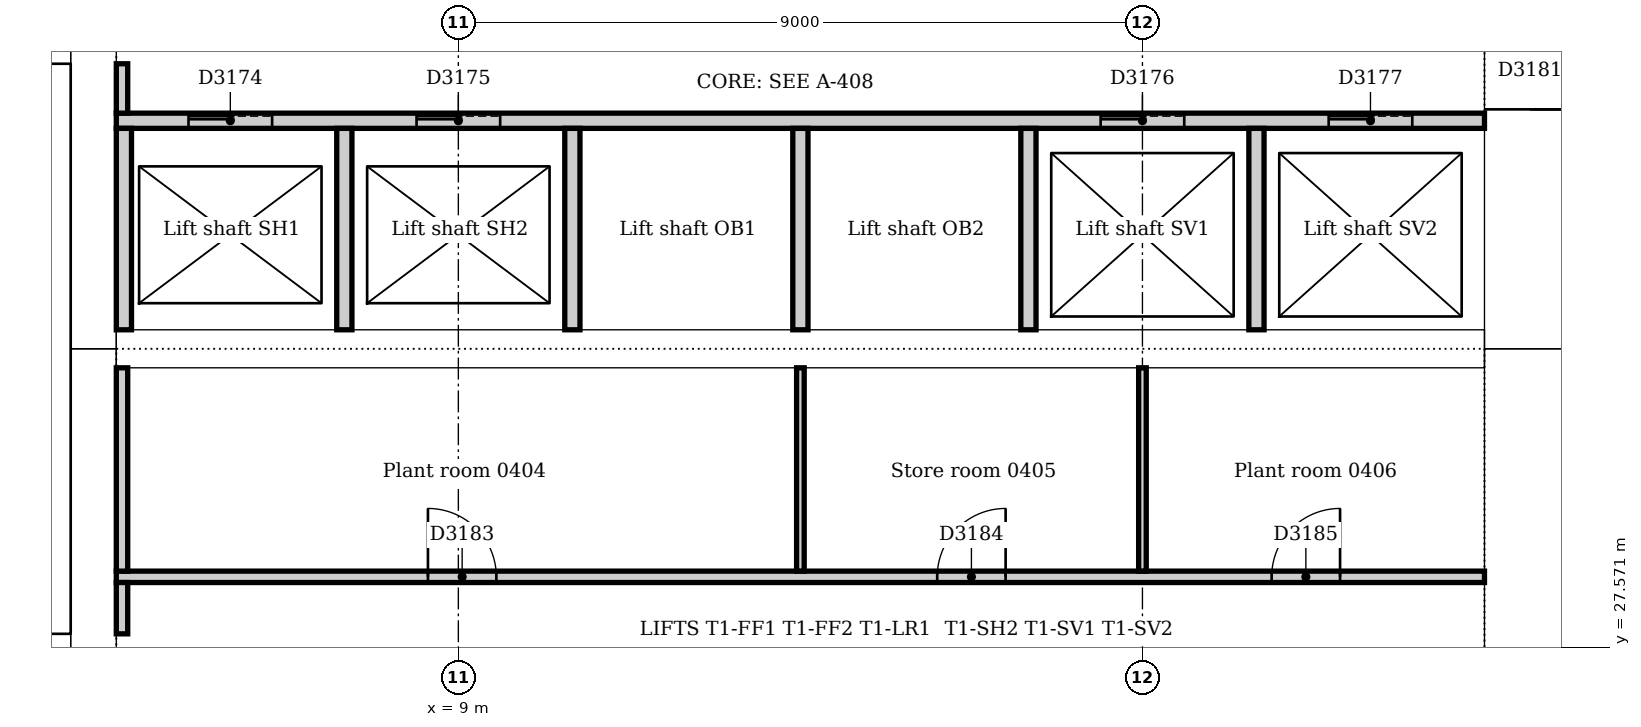
"""IFC4 building model, lengths in metres.
Left out: names, types, materials, properties, quantities, classifications, styles, units other than length and angle.
Written with IfcOpenShell. Run it as: python <this file> out.ifc"""

import sys

from ifc_helpers import new_model, si_unit, direction, frame, frame_2d, origin, place, context, subcontext, project, spatial, rectangle, extrude, element, fill, save


model = new_model("IFC4")
c1 = context("Model", 3, precision=1e-05, world=origin(), true_north=direction((0.0, 1.0)))
c2 = subcontext(c1, "Body", "Model", "MODEL_VIEW")
j1 = project(units=[si_unit("LENGTHUNIT", "METRE"), si_unit("PLANEANGLEUNIT", "RADIAN")], contexts=[c1])
p1 = place(None, origin())
s1 = spatial("IfcSite", under=j1, at=p1, CompositionType="ELEMENT")
p2 = place(p1, origin())
s2 = spatial("IfcBuilding", under=s1, at=p2, CompositionType="ELEMENT")
p3 = place(p2, frame((0.0, 0.0, 21.0)))
s3 = spatial("IfcBuildingStorey", under=s2, at=p3, CompositionType="ELEMENT", Elevation=21.0)
p4 = place(p3, frame((23.1, 21.0, 0.0), z_axis=(0.0, 0.0, 1.0), x_axis=(0.0, 1.0, 0.0)))
e1 = element("IfcWall", 1, at=p4, inside=s3, PredefinedType="SOLIDWALL", context=c2, shape_type="SweptSolid", body=[
    extrude(rectangle(XDim=10.5, YDim=1.2, at=frame_2d((5.25, 0.0))), origin(), (0.0, 0.0, 1.0), 5.0),
])
p5 = place(p4, frame((4.35, 0.0, 0.0)))
e2 = element("IfcOpeningElement", 2, at=p5, cuts=e1, PredefinedType="OPENING", context=c2, shape_type="SweptSolid", body=[
    extrude(rectangle(XDim=1.8, YDim=2.1, at=frame_2d((0.9, 1.05))), frame((0.0, 0.61, 0.0), z_axis=(0.0, -1.0, 0.0), x_axis=(1.0, 0.0, 0.0)), (0.0, 0.0, 1.0), 1.22),
])
p6 = place(p3, frame((23.1, 31.5, 0.0), z_axis=(0.0, 0.0, 1.0), x_axis=(0.0, 1.0, 0.0)))
e3 = element("IfcWall", 3, at=p6, inside=s3, PredefinedType="SOLIDWALL", context=c2, shape_type="SweptSolid", body=[
    extrude(rectangle(XDim=10.5, YDim=1.2, at=frame_2d((5.25, 0.0))), origin(), (0.0, 0.0, 1.0), 5.0),
])
p7 = place(p6, frame((3.15, 0.0, 0.0)))
e4 = element("IfcOpeningElement", 4, at=p7, cuts=e3, PredefinedType="OPENING", context=c2, shape_type="SweptSolid", body=[
    extrude(rectangle(XDim=1.0, YDim=2.1, at=frame_2d((0.5, 1.05))), frame((0.0, 0.61, 0.0), z_axis=(0.0, -1.0, 0.0), x_axis=(1.0, 0.0, 0.0)), (0.0, 0.0, 1.0), 1.22),
])
p8 = place(p6, frame((5.2, 0.0, 0.0)))
e5 = element("IfcOpeningElement", 5, at=p8, cuts=e3, PredefinedType="OPENING", context=c2, shape_type="SweptSolid", body=[
    extrude(rectangle(XDim=1.0, YDim=2.1, at=frame_2d((0.5, 1.05))), frame((0.0, 0.61, 0.0), z_axis=(0.0, -1.0, 0.0), x_axis=(1.0, 0.0, 0.0)), (0.0, 0.0, 1.0), 1.22),
])
p9 = place(p3, frame((4.2, 42.0, 0.0), z_axis=(0.0, 0.0, 1.0), x_axis=(0.0, -1.0, 0.0)))
e6 = element("IfcWall", 6, at=p9, inside=s3, PredefinedType="SOLIDWALL", context=c2, shape_type="SweptSolid", body=[
    extrude(rectangle(XDim=10.5, YDim=0.6, at=frame_2d((5.25, 0.0))), origin(), (0.0, 0.0, 1.0), 5.0),
])
p10 = place(p9, frame((5.3, 0.0, 0.0)))
e7 = element("IfcOpeningElement", 7, at=p10, cuts=e6, PredefinedType="OPENING", context=c2, shape_type="SweptSolid", body=[
    extrude(rectangle(XDim=1.0, YDim=2.1, at=frame_2d((0.5, 1.05))), frame((0.0, 0.31, 0.0), z_axis=(0.0, -1.0, 0.0), x_axis=(1.0, 0.0, 0.0)), (0.0, 0.0, 1.0), 0.62),
])
p11 = place(p3, frame((4.2, 31.5, 0.0), z_axis=(0.0, 0.0, 1.0), x_axis=(0.0, -1.0, 0.0)))
e8 = element("IfcWall", 8, at=p11, inside=s3, PredefinedType="SOLIDWALL", context=c2, shape_type="SweptSolid", body=[
    extrude(rectangle(XDim=10.5, YDim=0.6, at=frame_2d((5.25, 0.0))), origin(), (0.0, 0.0, 1.0), 5.0),
])
p12 = place(p11, frame((4.25, 0.0, 0.0)))
e9 = element("IfcOpeningElement", 9, at=p12, cuts=e8, PredefinedType="OPENING", context=c2, shape_type="SweptSolid", body=[
    extrude(rectangle(XDim=1.0, YDim=2.1, at=frame_2d((0.5, 1.05))), frame((0.0, 0.31, 0.0), z_axis=(0.0, -1.0, 0.0), x_axis=(1.0, 0.0, 0.0)), (0.0, 0.0, 1.0), 0.62),
])
p13 = place(p3, frame((4.5, 31.5, 0.0), z_axis=(0.0, 0.0, 1.0), x_axis=(1.0, 0.0, 0.0)))
e10 = element("IfcWall", 10, at=p13, inside=s3, PredefinedType="SOLIDWALL", context=c2, shape_type="SweptSolid", body=[
    extrude(rectangle(XDim=18.0, YDim=0.5, at=frame_2d((9.0, 0.0))), origin(), (0.0, 0.0, 1.0), 5.0),
])
p14 = place(p3, frame((3.9, 27.625, 0.0), z_axis=(0.0, 0.0, 1.0), x_axis=(-1.0, 0.0, 0.0)))
e11 = element("IfcWall", 11, at=p14, inside=s3, PredefinedType="SOLIDWALL", context=c2, shape_type="SweptSolid", body=[
    extrude(rectangle(XDim=3.54, YDim=0.25, at=frame_2d((1.77, 0.0))), origin(), (0.0, 0.0, 1.0), 5.0),
])
p15 = place(p14, frame((0.4, 0.0, 0.0)))
e12 = element("IfcOpeningElement", 12, at=p15, cuts=e11, PredefinedType="OPENING", context=c2, shape_type="SweptSolid", body=[
    extrude(rectangle(XDim=1.0, YDim=2.1, at=frame_2d((0.5, 1.05))), frame((0.0, 0.135, 0.0), z_axis=(0.0, -1.0, 0.0), x_axis=(1.0, 0.0, 0.0)), (0.0, 0.0, 1.0), 0.27),
])
p16 = place(p3, frame((0.36, 35.375, 0.0), z_axis=(0.0, 0.0, 1.0), x_axis=(1.0, 0.0, 0.0)))
e13 = element("IfcWall", 13, at=p16, inside=s3, PredefinedType="SOLIDWALL", context=c2, shape_type="SweptSolid", body=[
    extrude(rectangle(XDim=3.54, YDim=0.25, at=frame_2d((1.77, 0.0))), origin(), (0.0, 0.0, 1.0), 5.0),
])
p17 = place(p16, frame((2.14, 0.0, 0.0)))
e14 = element("IfcOpeningElement", 14, at=p17, cuts=e13, PredefinedType="OPENING", context=c2, shape_type="SweptSolid", body=[
    extrude(rectangle(XDim=1.0, YDim=2.1, at=frame_2d((0.5, 1.05))), frame((0.0, 0.135, 0.0), z_axis=(0.0, -1.0, 0.0), x_axis=(1.0, 0.0, 0.0)), (0.0, 0.0, 1.0), 0.27),
])
p18 = place(p3, frame((4.5, 34.5, 0.0), z_axis=(0.0, 0.0, 1.0), x_axis=(1.0, 0.0, 0.0)))
e15 = element("IfcWall", 15, at=p18, inside=s3, PredefinedType="PARTITIONING", context=c2, shape_type="SweptSolid", body=[
    extrude(rectangle(XDim=18.0, YDim=0.2, at=frame_2d((9.0, 0.0))), origin(), (0.0, 0.0, 1.0), 4.85),
])
p19 = place(p18, frame((0.95, 0.0, 0.0)))
e16 = element("IfcOpeningElement", 16, at=p19, cuts=e15, PredefinedType="OPENING", context=c2, shape_type="SweptSolid", body=[
    extrude(rectangle(XDim=1.1, YDim=2.1, at=frame_2d((0.55, 1.05))), frame((0.0, 0.11, 0.0), z_axis=(0.0, -1.0, 0.0), x_axis=(1.0, 0.0, 0.0)), (0.0, 0.0, 1.0), 0.22),
])
p20 = place(p18, frame((3.95, 0.0, 0.0)))
e17 = element("IfcOpeningElement", 17, at=p20, cuts=e15, PredefinedType="OPENING", context=c2, shape_type="SweptSolid", body=[
    extrude(rectangle(XDim=1.1, YDim=2.1, at=frame_2d((0.55, 1.05))), frame((0.0, 0.11, 0.0), z_axis=(0.0, -1.0, 0.0), x_axis=(1.0, 0.0, 0.0)), (0.0, 0.0, 1.0), 0.22),
])
p21 = place(p18, frame((12.95, 0.0, 0.0)))
e18 = element("IfcOpeningElement", 18, at=p21, cuts=e15, PredefinedType="OPENING", context=c2, shape_type="SweptSolid", body=[
    extrude(rectangle(XDim=1.1, YDim=2.1, at=frame_2d((0.55, 1.05))), frame((0.0, 0.11, 0.0), z_axis=(0.0, -1.0, 0.0), x_axis=(1.0, 0.0, 0.0)), (0.0, 0.0, 1.0), 0.22),
])
p22 = place(p18, frame((15.95, 0.0, 0.0)))
e19 = element("IfcOpeningElement", 19, at=p22, cuts=e15, PredefinedType="OPENING", context=c2, shape_type="SweptSolid", body=[
    extrude(rectangle(XDim=1.1, YDim=2.1, at=frame_2d((0.55, 1.05))), frame((0.0, 0.11, 0.0), z_axis=(0.0, -1.0, 0.0), x_axis=(1.0, 0.0, 0.0)), (0.0, 0.0, 1.0), 0.22),
])
for number, where, z_axis, x_axis in (
    (20, (4.6, 31.75, 0.0), (0.0, 0.0, 1.0), (0.0, 1.0, 0.0)),
    (21, (7.5, 31.75, 0.0), (0.0, 0.0, 1.0), (0.0, 1.0, 0.0)),
    (22, (10.5, 31.75, 0.0), (0.0, 0.0, 1.0), (0.0, 1.0, 0.0)),
    (23, (13.5, 31.75, 0.0), (0.0, 0.0, 1.0), (0.0, 1.0, 0.0)),
    (24, (16.5, 31.75, 0.0), (0.0, 0.0, 1.0), (0.0, 1.0, 0.0)),
    (25, (19.5, 31.75, 0.0), (0.0, 0.0, 1.0), (0.0, 1.0, 0.0)),
):
    element("IfcWall", number, at=place(p3, frame(where, z_axis=z_axis, x_axis=x_axis)), inside=s3, PredefinedType="PARTITIONING", context=c2, shape_type="SweptSolid", body=[
        extrude(rectangle(XDim=2.65, YDim=0.2, at=frame_2d((1.325, 0.0))), origin(), (0.0, 0.0, 1.0), 4.85),
    ])
p23 = place(p3, frame((4.5, 28.5, 0.0), z_axis=(0.0, 0.0, 1.0), x_axis=(1.0, 0.0, 0.0)))
e26 = element("IfcWall", 26, at=p23, inside=s3, PredefinedType="PARTITIONING", context=c2, shape_type="SweptSolid", body=[
    extrude(rectangle(XDim=18.0, YDim=0.15, at=frame_2d((9.0, 0.0))), origin(), (0.0, 0.0, 1.0), 4.85),
])
p24 = place(p23, frame((4.1, 0.0, 0.0)))
e27 = element("IfcOpeningElement", 27, at=p24, cuts=e26, PredefinedType="OPENING", context=c2, shape_type="SweptSolid", body=[
    extrude(rectangle(XDim=0.9, YDim=2.1, at=frame_2d((0.45, 1.05))), frame((0.0, 0.085, 0.0), z_axis=(0.0, -1.0, 0.0), x_axis=(1.0, 0.0, 0.0)), (0.0, 0.0, 1.0), 0.17),
])
p25 = place(p23, frame((10.8, 0.0, 0.0)))
e28 = element("IfcOpeningElement", 28, at=p25, cuts=e26, PredefinedType="OPENING", context=c2, shape_type="SweptSolid", body=[
    extrude(rectangle(XDim=0.9, YDim=2.1, at=frame_2d((0.45, 1.05))), frame((0.0, 0.085, 0.0), z_axis=(0.0, -1.0, 0.0), x_axis=(1.0, 0.0, 0.0)), (0.0, 0.0, 1.0), 0.17),
])
p26 = place(p23, frame((15.2, 0.0, 0.0)))
e29 = element("IfcOpeningElement", 29, at=p26, cuts=e26, PredefinedType="OPENING", context=c2, shape_type="SweptSolid", body=[
    extrude(rectangle(XDim=0.9, YDim=2.1, at=frame_2d((0.45, 1.05))), frame((0.0, 0.085, 0.0), z_axis=(0.0, -1.0, 0.0), x_axis=(1.0, 0.0, 0.0)), (0.0, 0.0, 1.0), 0.17),
])
p27 = place(p3, frame((4.575, 27.75, 0.0), z_axis=(0.0, 0.0, 1.0), x_axis=(0.0, 1.0, 0.0)))
e30 = element("IfcWall", 30, at=p27, inside=s3, PredefinedType="PARTITIONING", context=c2, shape_type="SweptSolid", body=[
    extrude(rectangle(XDim=0.675, YDim=0.15, at=frame_2d((0.338, 0.0))), origin(), (0.0, 0.0, 1.0), 4.85),
])
p28 = place(p3, frame((4.575, 28.575, 0.0), z_axis=(0.0, 0.0, 1.0), x_axis=(0.0, 1.0, 0.0)))
e31 = element("IfcWall", 31, at=p28, inside=s3, PredefinedType="PARTITIONING", context=c2, shape_type="SweptSolid", body=[
    extrude(rectangle(XDim=2.675, YDim=0.15, at=frame_2d((1.337, 0.0))), origin(), (0.0, 0.0, 1.0), 4.85),
])
p29 = place(p3, frame((4.575, 34.6, 0.0), z_axis=(0.0, 0.0, 1.0), x_axis=(0.0, 1.0, 0.0)))
e32 = element("IfcWall", 32, at=p29, inside=s3, PredefinedType="PARTITIONING", context=c2, shape_type="SweptSolid", body=[
    extrude(rectangle(XDim=0.65, YDim=0.15, at=frame_2d((0.325, 0.0))), origin(), (0.0, 0.0, 1.0), 4.85),
])
for number, where, z_axis, x_axis in (
    (33, (13.5, 28.575, 0.0), (0.0, 0.0, 1.0), (0.0, 1.0, 0.0)),
    (34, (18.0, 28.575, 0.0), (0.0, 0.0, 1.0), (0.0, 1.0, 0.0)),
):
    element("IfcWall", number, at=place(p3, frame(where, z_axis=z_axis, x_axis=x_axis)), inside=s3, PredefinedType="PARTITIONING", context=c2, shape_type="SweptSolid", body=[
        extrude(rectangle(XDim=2.675, YDim=0.1, at=frame_2d((1.337, 0.0))), origin(), (0.0, 0.0, 1.0), 4.85),
    ])
p30 = place(p19, origin())
e35 = element("IfcDoor", 35, at=p30, inside=s3, OperationType="SLIDING_TO_LEFT", PredefinedType="DOOR", context=c2, shape_type="SweptSolid", body=[
    extrude(rectangle(XDim=1.1, YDim=2.1, at=frame_2d((0.55, 1.05))), frame((0.0, 0.025, 0.0), z_axis=(0.0, -1.0, 0.0), x_axis=(1.0, 0.0, 0.0)), (0.0, 0.0, 1.0), 0.05),
])
fill(e16, e35)
p31 = place(p20, origin())
e36 = element("IfcDoor", 36, at=p31, inside=s3, OperationType="SLIDING_TO_LEFT", PredefinedType="DOOR", context=c2, shape_type="SweptSolid", body=[
    extrude(rectangle(XDim=1.1, YDim=2.1, at=frame_2d((0.55, 1.05))), frame((0.0, 0.025, 0.0), z_axis=(0.0, -1.0, 0.0), x_axis=(1.0, 0.0, 0.0)), (0.0, 0.0, 1.0), 0.05),
])
fill(e17, e36)
p32 = place(p21, origin())
e37 = element("IfcDoor", 37, at=p32, inside=s3, OperationType="SLIDING_TO_LEFT", PredefinedType="DOOR", context=c2, shape_type="SweptSolid", body=[
    extrude(rectangle(XDim=1.1, YDim=2.1, at=frame_2d((0.55, 1.05))), frame((0.0, 0.025, 0.0), z_axis=(0.0, -1.0, 0.0), x_axis=(1.0, 0.0, 0.0)), (0.0, 0.0, 1.0), 0.05),
])
fill(e18, e37)
p33 = place(p22, origin())
e38 = element("IfcDoor", 38, at=p33, inside=s3, OperationType="SLIDING_TO_LEFT", PredefinedType="DOOR", context=c2, shape_type="SweptSolid", body=[
    extrude(rectangle(XDim=1.1, YDim=2.1, at=frame_2d((0.55, 1.05))), frame((0.0, 0.025, 0.0), z_axis=(0.0, -1.0, 0.0), x_axis=(1.0, 0.0, 0.0)), (0.0, 0.0, 1.0), 0.05),
])
fill(e19, e38)
p34 = place(p7, frame((1.0, 0.0, 0.0), z_axis=(0.0, 0.0, 1.0), x_axis=(-1.0, 0.0, 0.0)))
e39 = element("IfcDoor", 39, at=p34, inside=s3, OperationType="SINGLE_SWING_RIGHT", PredefinedType="DOOR", context=c2, shape_type="SweptSolid", body=[
    extrude(rectangle(XDim=1.0, YDim=2.1, at=frame_2d((0.5, 1.05))), frame((0.0, 0.025, 0.0), z_axis=(0.0, -1.0, 0.0), x_axis=(1.0, 0.0, 0.0)), (0.0, 0.0, 1.0), 0.05),
])
fill(e4, e39)
p35 = place(p24, origin())
e40 = element("IfcDoor", 40, at=p35, inside=s3, OperationType="SINGLE_SWING_LEFT", PredefinedType="DOOR", context=c2, shape_type="SweptSolid", body=[
    extrude(rectangle(XDim=0.9, YDim=2.1, at=frame_2d((0.45, 1.05))), frame((0.0, 0.025, 0.0), z_axis=(0.0, -1.0, 0.0), x_axis=(1.0, 0.0, 0.0)), (0.0, 0.0, 1.0), 0.05),
])
fill(e27, e40)
p36 = place(p25, origin())
e41 = element("IfcDoor", 41, at=p36, inside=s3, OperationType="SINGLE_SWING_RIGHT", PredefinedType="DOOR", context=c2, shape_type="SweptSolid", body=[
    extrude(rectangle(XDim=0.9, YDim=2.1, at=frame_2d((0.45, 1.05))), frame((0.0, 0.025, 0.0), z_axis=(0.0, -1.0, 0.0), x_axis=(1.0, 0.0, 0.0)), (0.0, 0.0, 1.0), 0.05),
])
fill(e28, e41)
p37 = place(p26, origin())
e42 = element("IfcDoor", 42, at=p37, inside=s3, OperationType="SINGLE_SWING_RIGHT", PredefinedType="DOOR", context=c2, shape_type="SweptSolid", body=[
    extrude(rectangle(XDim=0.9, YDim=2.1, at=frame_2d((0.45, 1.05))), frame((0.0, 0.025, 0.0), z_axis=(0.0, -1.0, 0.0), x_axis=(1.0, 0.0, 0.0)), (0.0, 0.0, 1.0), 0.05),
])
fill(e29, e42)
save(model, sys.argv[1])
